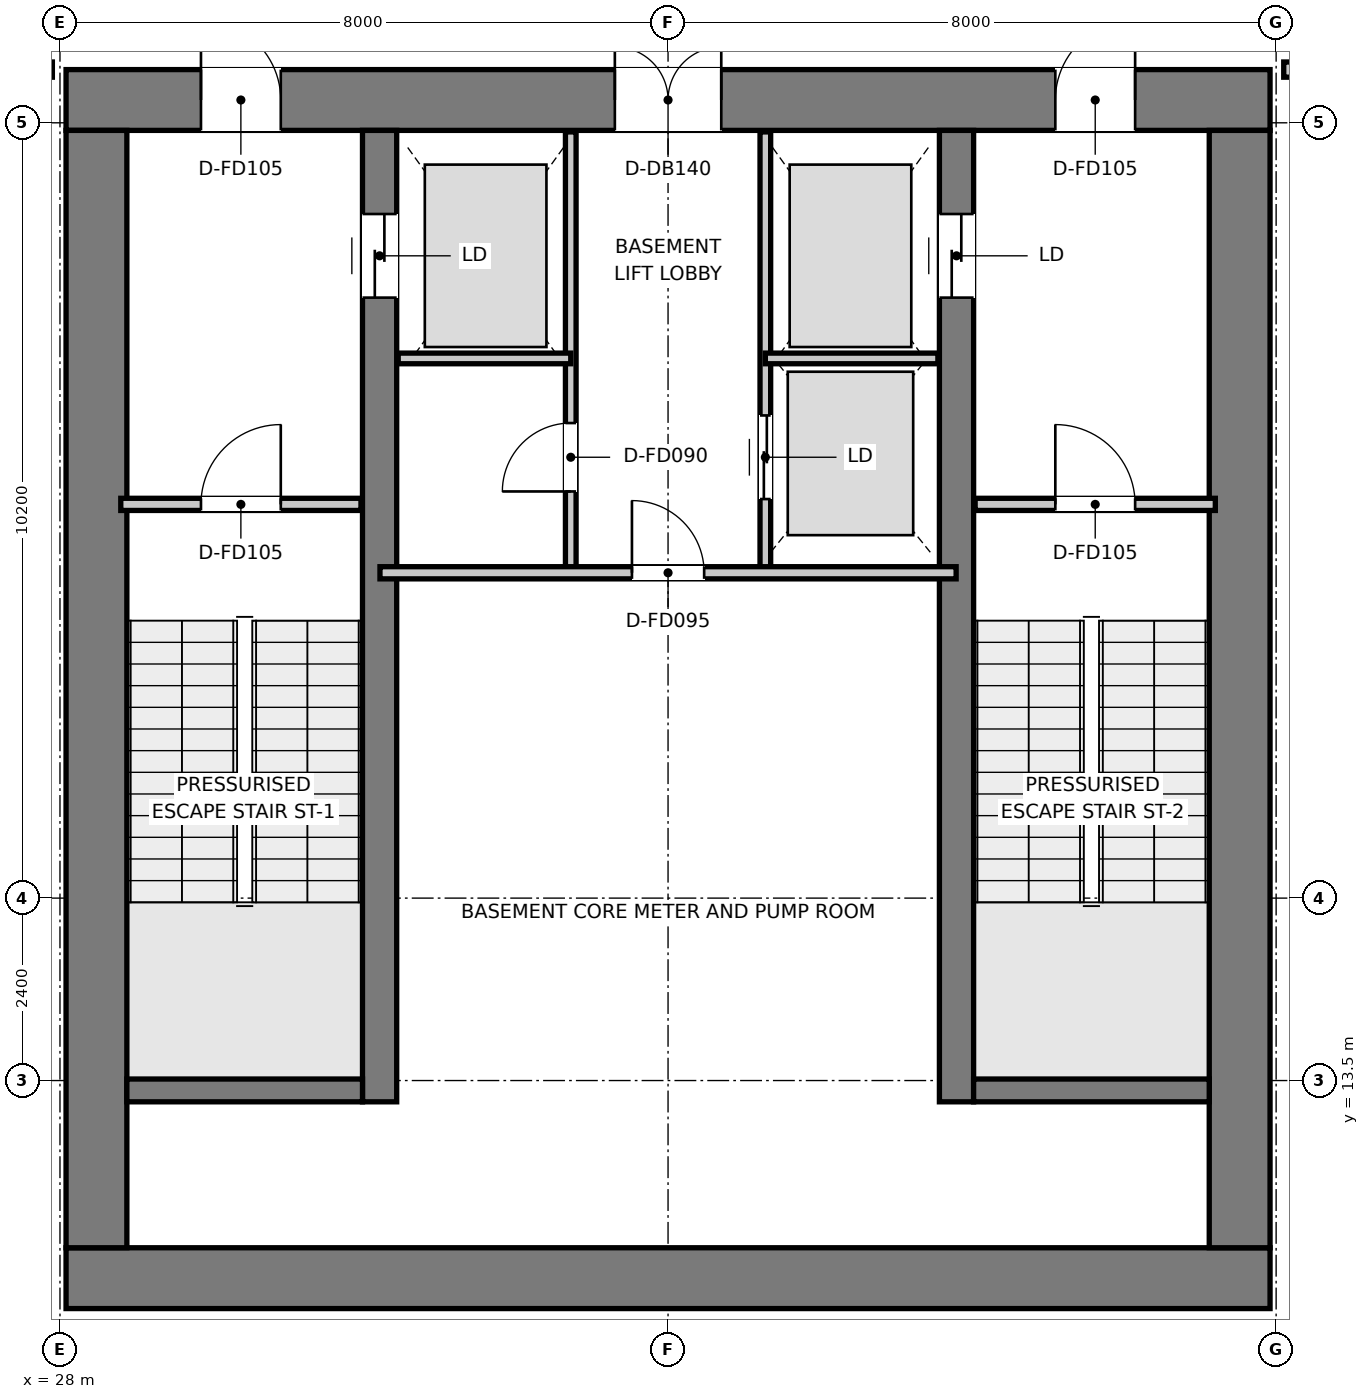
"""IFC4 building model, lengths in metres.
Left out: names, types, materials, properties, quantities, classifications, styles, units other than length and angle.
Written with IfcOpenShell. Run it as: python <this file> out.ifc"""

import sys

from ifc_helpers import new_model, si_unit, direction, frame, frame_2d, origin, place, context, subcontext, project, spatial, rectangle, extrude, element, fill, save


model = new_model("IFC4")
c1 = context("Model", 3, precision=1e-05, world=origin(), true_north=direction((0.0, 1.0)))
c2 = subcontext(c1, "Body", "Model", "MODEL_VIEW")
j1 = project(units=[si_unit("LENGTHUNIT", "METRE"), si_unit("PLANEANGLEUNIT", "RADIAN")], contexts=[c1])
p1 = place(None, origin())
s1 = spatial("IfcSite", under=j1, at=p1, CompositionType="ELEMENT")
p2 = place(p1, origin())
s2 = spatial("IfcBuilding", under=s1, at=p2, CompositionType="ELEMENT")
p3 = place(p2, frame((0.0, 0.0, -4.8)))
s3 = spatial("IfcBuildingStorey", under=s2, at=p3, CompositionType="ELEMENT", Elevation=-4.8)
p4 = place(p3, frame((28.08, 10.9, 0.0), z_axis=(0.0, 0.0, 1.0), x_axis=(1.0, 0.0, 0.0)))
e1 = element("IfcWall", 1, at=p4, inside=s3, PredefinedType="SHEAR", context=c2, shape_type="SweptSolid", body=[
    extrude(rectangle(XDim=15.84, YDim=0.8, at=frame_2d((7.92, 0.0))), origin(), (0.0, 0.0, 1.0), 4.8),
])
p5 = place(p3, frame((28.08, 26.4, 0.0), z_axis=(0.0, 0.0, 1.0), x_axis=(1.0, 0.0, 0.0)))
e2 = element("IfcWall", 2, at=p5, inside=s3, PredefinedType="SHEAR", context=c2, shape_type="SweptSolid", body=[
    extrude(rectangle(XDim=15.84, YDim=0.8, at=frame_2d((7.92, 0.0))), origin(), (0.0, 0.0, 1.0), 4.8),
])
p6 = place(p5, frame((7.22, 0.0, 0.0)))
e3 = element("IfcOpeningElement", 3, at=p6, cuts=e2, PredefinedType="OPENING", context=c2, shape_type="SweptSolid", body=[
    extrude(rectangle(XDim=1.4, YDim=2.2, at=frame_2d((0.7, 1.1))), frame((0.0, 0.41, 0.0), z_axis=(0.0, -1.0, 0.0), x_axis=(1.0, 0.0, 0.0)), (0.0, 0.0, 1.0), 0.82),
])
p7 = place(p5, frame((1.775, 0.0, 0.0)))
e4 = element("IfcOpeningElement", 4, at=p7, cuts=e2, PredefinedType="OPENING", context=c2, shape_type="SweptSolid", body=[
    extrude(rectangle(XDim=1.05, YDim=2.1, at=frame_2d((0.525, 1.05))), frame((0.0, 0.41, 0.0), z_axis=(0.0, -1.0, 0.0), x_axis=(1.0, 0.0, 0.0)), (0.0, 0.0, 1.0), 0.82),
])
p8 = place(p5, frame((13.015, 0.0, 0.0)))
e5 = element("IfcOpeningElement", 5, at=p8, cuts=e2, PredefinedType="OPENING", context=c2, shape_type="SweptSolid", body=[
    extrude(rectangle(XDim=1.05, YDim=2.1, at=frame_2d((0.525, 1.05))), frame((0.0, 0.41, 0.0), z_axis=(0.0, -1.0, 0.0), x_axis=(1.0, 0.0, 0.0)), (0.0, 0.0, 1.0), 0.82),
])
for number, where, z_axis, x_axis in (
    (6, (28.48, 11.3, 0.0), (0.0, 0.0, 1.0), (0.0, 1.0, 0.0)),
    (7, (43.52, 11.3, 0.0), (0.0, 0.0, 1.0), (0.0, 1.0, 0.0)),
):
    element("IfcWall", number, at=place(p3, frame(where, z_axis=z_axis, x_axis=x_axis)), inside=s3, PredefinedType="SHEAR", context=c2, shape_type="SweptSolid", body=[
        extrude(rectangle(XDim=14.7, YDim=0.8, at=frame_2d((7.35, 0.0))), origin(), (0.0, 0.0, 1.0), 4.8),
    ])
p9 = place(p3, frame((32.205, 13.22, 0.0), z_axis=(0.0, 0.0, 1.0), x_axis=(0.0, 1.0, 0.0)))
e8 = element("IfcWall", 8, at=p9, inside=s3, PredefinedType="SHEAR", context=c2, shape_type="SweptSolid", body=[
    extrude(rectangle(XDim=12.78, YDim=0.45, at=frame_2d((6.39, 0.0))), origin(), (0.0, 0.0, 1.0), 4.8),
])
p10 = place(p9, frame((10.58, 0.0, 0.0)))
e9 = element("IfcOpeningElement", 9, at=p10, cuts=e8, PredefinedType="OPENING", context=c2, shape_type="SweptSolid", body=[
    extrude(rectangle(XDim=1.1, YDim=2.15, at=frame_2d((0.55, 1.075))), frame((0.0, 0.235, 0.0), z_axis=(0.0, -1.0, 0.0), x_axis=(1.0, 0.0, 0.0)), (0.0, 0.0, 1.0), 0.47),
])
p11 = place(p3, frame((39.795, 13.22, 0.0), z_axis=(0.0, 0.0, 1.0), x_axis=(0.0, 1.0, 0.0)))
e10 = element("IfcWall", 10, at=p11, inside=s3, PredefinedType="SHEAR", context=c2, shape_type="SweptSolid", body=[
    extrude(rectangle(XDim=12.78, YDim=0.45, at=frame_2d((6.39, 0.0))), origin(), (0.0, 0.0, 1.0), 4.8),
])
p12 = place(p11, frame((10.58, 0.0, 0.0)))
e11 = element("IfcOpeningElement", 11, at=p12, cuts=e10, PredefinedType="OPENING", context=c2, shape_type="SweptSolid", body=[
    extrude(rectangle(XDim=1.1, YDim=2.15, at=frame_2d((0.55, 1.075))), frame((0.0, 0.235, 0.0), z_axis=(0.0, -1.0, 0.0), x_axis=(1.0, 0.0, 0.0)), (0.0, 0.0, 1.0), 0.47),
])
for number, where, z_axis, x_axis in (
    (12, (28.88, 13.37, 0.0), (0.0, 0.0, 1.0), (1.0, 0.0, 0.0)),
    (13, (40.02, 13.37, 0.0), (0.0, 0.0, 1.0), (1.0, 0.0, 0.0)),
):
    element("IfcWall", number, at=place(p3, frame(where, z_axis=z_axis, x_axis=x_axis)), inside=s3, PredefinedType="SHEAR", context=c2, shape_type="SweptSolid", body=[
        extrude(rectangle(XDim=3.1, YDim=0.3, at=frame_2d((1.55, 0.0))), origin(), (0.0, 0.0, 1.0), 4.8),
    ])
p13 = place(p3, frame((28.8, 21.08, 0.0), z_axis=(0.0, 0.0, 1.0), x_axis=(1.0, 0.0, 0.0)))
e14 = element("IfcWall", 14, at=p13, inside=s3, PredefinedType="PARTITIONING", context=c2, shape_type="SweptSolid", body=[
    extrude(rectangle(XDim=3.16, YDim=0.16, at=frame_2d((1.58, 0.0))), origin(), (0.0, 0.0, 1.0), 4.45),
])
p14 = place(p13, frame((1.055, 0.0, 0.0)))
e15 = element("IfcOpeningElement", 15, at=p14, cuts=e14, PredefinedType="OPENING", context=c2, shape_type="SweptSolid", body=[
    extrude(rectangle(XDim=1.05, YDim=2.1, at=frame_2d((0.525, 1.05))), frame((0.0, 0.09, 0.0), z_axis=(0.0, -1.0, 0.0), x_axis=(1.0, 0.0, 0.0)), (0.0, 0.0, 1.0), 0.18),
])
p15 = place(p3, frame((40.04, 21.08, 0.0), z_axis=(0.0, 0.0, 1.0), x_axis=(1.0, 0.0, 0.0)))
e16 = element("IfcWall", 16, at=p15, inside=s3, PredefinedType="PARTITIONING", context=c2, shape_type="SweptSolid", body=[
    extrude(rectangle(XDim=3.16, YDim=0.16, at=frame_2d((1.58, 0.0))), origin(), (0.0, 0.0, 1.0), 4.45),
])
p16 = place(p15, frame((1.055, 0.0, 0.0)))
e17 = element("IfcOpeningElement", 17, at=p16, cuts=e16, PredefinedType="OPENING", context=c2, shape_type="SweptSolid", body=[
    extrude(rectangle(XDim=1.05, YDim=2.1, at=frame_2d((0.525, 1.05))), frame((0.0, 0.09, 0.0), z_axis=(0.0, -1.0, 0.0), x_axis=(1.0, 0.0, 0.0)), (0.0, 0.0, 1.0), 0.18),
])
p17 = place(p3, frame((34.72, 20.2, 0.0), z_axis=(0.0, 0.0, 1.0), x_axis=(0.0, 1.0, 0.0)))
e18 = element("IfcWall", 18, at=p17, inside=s3, PredefinedType="PARTITIONING", context=c2, shape_type="SweptSolid", body=[
    extrude(rectangle(XDim=5.78, YDim=0.14, at=frame_2d((2.89, 0.0))), origin(), (0.0, 0.0, 1.0), 3.25),
])
p18 = place(p17, frame((1.05, 0.0, 0.0)))
e19 = element("IfcOpeningElement", 19, at=p18, cuts=e18, PredefinedType="OPENING", context=c2, shape_type="SweptSolid", body=[
    extrude(rectangle(XDim=0.9, YDim=2.1, at=frame_2d((0.45, 1.05))), frame((0.0, 0.08, 0.0), z_axis=(0.0, -1.0, 0.0), x_axis=(1.0, 0.0, 0.0)), (0.0, 0.0, 1.0), 0.16),
])
p19 = place(p3, frame((37.28, 20.2, 0.0), z_axis=(0.0, 0.0, 1.0), x_axis=(0.0, 1.0, 0.0)))
e20 = element("IfcWall", 20, at=p19, inside=s3, PredefinedType="PARTITIONING", context=c2, shape_type="SweptSolid", body=[
    extrude(rectangle(XDim=5.78, YDim=0.14, at=frame_2d((2.89, 0.0))), origin(), (0.0, 0.0, 1.0), 3.25),
])
p20 = place(p19, frame((0.95, 0.0, 0.0)))
e21 = element("IfcOpeningElement", 21, at=p20, cuts=e20, PredefinedType="OPENING", context=c2, shape_type="SweptSolid", body=[
    extrude(rectangle(XDim=1.1, YDim=2.15, at=frame_2d((0.55, 1.075))), frame((0.0, 0.08, 0.0), z_axis=(0.0, -1.0, 0.0), x_axis=(1.0, 0.0, 0.0)), (0.0, 0.0, 1.0), 0.16),
])
for number, where, z_axis, x_axis in (
    (22, (32.45, 23.0, 0.0), (0.0, 0.0, 1.0), (1.0, 0.0, 0.0)),
    (23, (37.28, 23.0, 0.0), (0.0, 0.0, 1.0), (1.0, 0.0, 0.0)),
):
    element("IfcWall", number, at=place(p3, frame(where, z_axis=z_axis, x_axis=x_axis)), inside=s3, PredefinedType="PARTITIONING", context=c2, shape_type="SweptSolid", body=[
        extrude(rectangle(XDim=2.27, YDim=0.14, at=frame_2d((1.135, 0.0))), origin(), (0.0, 0.0, 1.0), 3.25),
    ])
p21 = place(p3, frame((32.21, 20.18, 0.0), z_axis=(0.0, 0.0, 1.0), x_axis=(1.0, 0.0, 0.0)))
e24 = element("IfcWall", 24, at=p21, inside=s3, PredefinedType="PARTITIONING", context=c2, shape_type="SweptSolid", body=[
    extrude(rectangle(XDim=7.58, YDim=0.16, at=frame_2d((3.79, 0.0))), origin(), (0.0, 0.0, 1.0), 4.45),
])
p22 = place(p21, frame((3.315, 0.0, 0.0)))
e25 = element("IfcOpeningElement", 25, at=p22, cuts=e24, PredefinedType="OPENING", context=c2, shape_type="SweptSolid", body=[
    extrude(rectangle(XDim=0.95, YDim=2.1, at=frame_2d((0.475, 1.05))), frame((0.0, 0.09, 0.0), z_axis=(0.0, -1.0, 0.0), x_axis=(1.0, 0.0, 0.0)), (0.0, 0.0, 1.0), 0.18),
])
p23 = place(p3, frame((44.1, 26.8, 0.0), z_axis=(0.0, 0.0, 1.0), x_axis=(1.0, 0.0, 0.0)))
e26 = element("IfcWall", 26, at=p23, inside=s3, PredefinedType="PARTITIONING", context=c2, shape_type="SweptSolid", body=[
    extrude(rectangle(XDim=18.1, YDim=0.2, at=frame_2d((9.05, 0.0))), origin(), (0.0, 0.0, 1.0), 3.65),
])
p24 = place(p23, frame((4.3, 0.0, 0.0)))
e27 = element("IfcOpeningElement", 27, at=p24, cuts=e26, PredefinedType="OPENING", context=c2, shape_type="SweptSolid", body=[
    extrude(rectangle(XDim=1.2, YDim=2.15, at=frame_2d((0.6, 1.075))), frame((0.0, 0.11, 0.0), z_axis=(0.0, -1.0, 0.0), x_axis=(1.0, 0.0, 0.0)), (0.0, 0.0, 1.0), 0.22),
])
p25 = place(p23, frame((13.55, 0.0, 0.0)))
e28 = element("IfcOpeningElement", 28, at=p25, cuts=e26, PredefinedType="OPENING", context=c2, shape_type="SweptSolid", body=[
    extrude(rectangle(XDim=1.1, YDim=2.15, at=frame_2d((0.55, 1.075))), frame((0.0, 0.11, 0.0), z_axis=(0.0, -1.0, 0.0), x_axis=(1.0, 0.0, 0.0)), (0.0, 0.0, 1.0), 0.22),
])
p26 = place(p14, origin())
e29 = element("IfcDoor", 29, at=p26, inside=s3, OperationType="SINGLE_SWING_RIGHT", PredefinedType="DOOR", context=c2, shape_type="SweptSolid", body=[
    extrude(rectangle(XDim=1.05, YDim=2.1, at=frame_2d((0.525, 1.05))), frame((0.0, 0.025, 0.0), z_axis=(0.0, -1.0, 0.0), x_axis=(1.0, 0.0, 0.0)), (0.0, 0.0, 1.0), 0.05),
])
fill(e15, e29)
p27 = place(p16, origin())
e30 = element("IfcDoor", 30, at=p27, inside=s3, OperationType="SINGLE_SWING_LEFT", PredefinedType="DOOR", context=c2, shape_type="SweptSolid", body=[
    extrude(rectangle(XDim=1.05, YDim=2.1, at=frame_2d((0.525, 1.05))), frame((0.0, 0.025, 0.0), z_axis=(0.0, -1.0, 0.0), x_axis=(1.0, 0.0, 0.0)), (0.0, 0.0, 1.0), 0.05),
])
fill(e17, e30)
p28 = place(p6, origin())
e31 = element("IfcDoor", 31, at=p28, inside=s3, OperationType="DOUBLE_DOOR_SINGLE_SWING", PredefinedType="DOOR", context=c2, shape_type="SweptSolid", body=[
    extrude(rectangle(XDim=1.4, YDim=2.2, at=frame_2d((0.7, 1.1))), frame((0.0, 0.025, 0.0), z_axis=(0.0, -1.0, 0.0), x_axis=(1.0, 0.0, 0.0)), (0.0, 0.0, 1.0), 0.05),
])
fill(e3, e31)
p29 = place(p7, origin())
e32 = element("IfcDoor", 32, at=p29, inside=s3, OperationType="SINGLE_SWING_LEFT", PredefinedType="DOOR", context=c2, shape_type="SweptSolid", body=[
    extrude(rectangle(XDim=1.05, YDim=2.1, at=frame_2d((0.525, 1.05))), frame((0.0, 0.025, 0.0), z_axis=(0.0, -1.0, 0.0), x_axis=(1.0, 0.0, 0.0)), (0.0, 0.0, 1.0), 0.05),
])
fill(e4, e32)
p30 = place(p8, origin())
e33 = element("IfcDoor", 33, at=p30, inside=s3, OperationType="SINGLE_SWING_RIGHT", PredefinedType="DOOR", context=c2, shape_type="SweptSolid", body=[
    extrude(rectangle(XDim=1.05, YDim=2.1, at=frame_2d((0.525, 1.05))), frame((0.0, 0.025, 0.0), z_axis=(0.0, -1.0, 0.0), x_axis=(1.0, 0.0, 0.0)), (0.0, 0.0, 1.0), 0.05),
])
fill(e5, e33)
p31 = place(p10, origin())
e34 = element("IfcDoor", 34, at=p31, inside=s3, OperationType="DOUBLE_DOOR_SLIDING", PredefinedType="DOOR", context=c2, shape_type="SweptSolid", body=[
    extrude(rectangle(XDim=1.1, YDim=2.15, at=frame_2d((0.55, 1.075))), frame((0.0, 0.025, 0.0), z_axis=(0.0, -1.0, 0.0), x_axis=(1.0, 0.0, 0.0)), (0.0, 0.0, 1.0), 0.05),
])
fill(e9, e34)
p32 = place(p12, origin())
e35 = element("IfcDoor", 35, at=p32, inside=s3, OperationType="DOUBLE_DOOR_SLIDING", PredefinedType="DOOR", context=c2, shape_type="SweptSolid", body=[
    extrude(rectangle(XDim=1.1, YDim=2.15, at=frame_2d((0.55, 1.075))), frame((0.0, 0.025, 0.0), z_axis=(0.0, -1.0, 0.0), x_axis=(1.0, 0.0, 0.0)), (0.0, 0.0, 1.0), 0.05),
])
fill(e11, e35)
p33 = place(p18, origin())
e36 = element("IfcDoor", 36, at=p33, inside=s3, OperationType="SINGLE_SWING_LEFT", PredefinedType="DOOR", context=c2, shape_type="SweptSolid", body=[
    extrude(rectangle(XDim=0.9, YDim=2.1, at=frame_2d((0.45, 1.05))), frame((0.0, 0.025, 0.0), z_axis=(0.0, -1.0, 0.0), x_axis=(1.0, 0.0, 0.0)), (0.0, 0.0, 1.0), 0.05),
])
fill(e19, e36)
p34 = place(p20, origin())
e37 = element("IfcDoor", 37, at=p34, inside=s3, OperationType="DOUBLE_DOOR_SLIDING", PredefinedType="DOOR", context=c2, shape_type="SweptSolid", body=[
    extrude(rectangle(XDim=1.1, YDim=2.15, at=frame_2d((0.55, 1.075))), frame((0.0, 0.025, 0.0), z_axis=(0.0, -1.0, 0.0), x_axis=(1.0, 0.0, 0.0)), (0.0, 0.0, 1.0), 0.05),
])
fill(e21, e37)
p35 = place(p22, origin())
e38 = element("IfcDoor", 38, at=p35, inside=s3, OperationType="SINGLE_SWING_LEFT", PredefinedType="DOOR", context=c2, shape_type="SweptSolid", body=[
    extrude(rectangle(XDim=0.95, YDim=2.1, at=frame_2d((0.475, 1.05))), frame((0.0, 0.025, 0.0), z_axis=(0.0, -1.0, 0.0), x_axis=(1.0, 0.0, 0.0)), (0.0, 0.0, 1.0), 0.05),
])
fill(e25, e38)
save(model, sys.argv[1])
